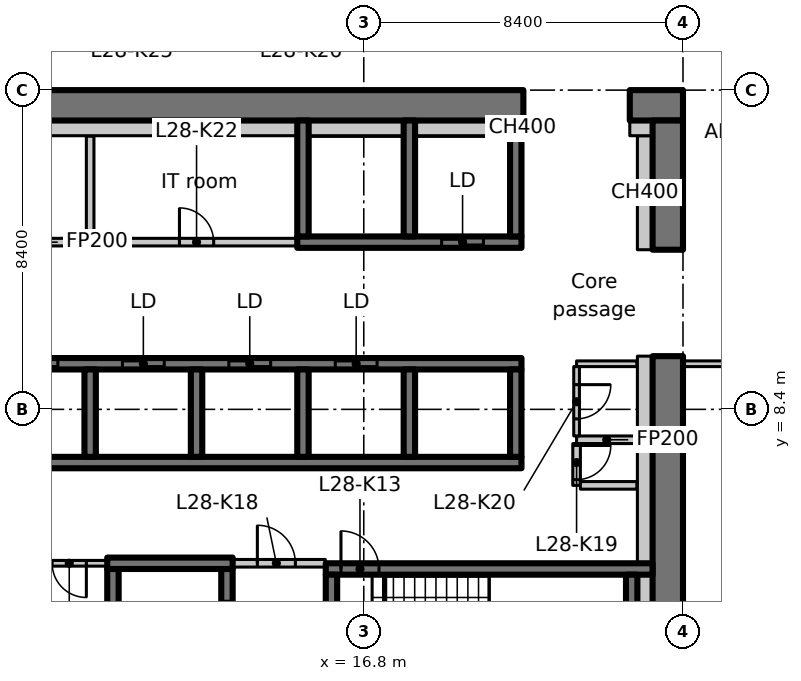
"""IFC4 building model, lengths in metres.
Left out: names, types, materials, properties, quantities, classifications, styles, units other than length and angle.
Written with IfcOpenShell. Run it as: python <this file> out.ifc"""

import sys

from ifc_helpers import new_model, si_unit, direction, frame, frame_2d, origin, place, context, subcontext, project, spatial, rectangle, extrude, element, fill, save


model = new_model("IFC4")
c1 = context("Model", 3, precision=1e-05, world=origin(), true_north=direction((0.0, 1.0)))
c2 = subcontext(c1, "Body", "Model", "MODEL_VIEW")
j1 = project(units=[si_unit("LENGTHUNIT", "METRE"), si_unit("PLANEANGLEUNIT", "RADIAN")], contexts=[c1])
p1 = place(None, origin())
s1 = spatial("IfcSite", under=j1, at=p1, CompositionType="ELEMENT")
p2 = place(p1, origin())
s2 = spatial("IfcBuilding", under=s1, at=p2, CompositionType="ELEMENT")
p3 = place(p2, frame((0.0, 0.0, 116.9)))
s3 = spatial("IfcBuildingStorey", under=s2, at=p3, CompositionType="ELEMENT", Elevation=116.9)
p4 = place(p3, frame((-1.1, 16.4, 0.0), z_axis=(0.0, 0.0, 1.0), x_axis=(1.0, 0.0, 0.0)))
e1 = element("IfcWall", 1, at=p4, inside=s3, PredefinedType="SHEAR", context=c2, shape_type="SweptSolid", body=[
    extrude(rectangle(XDim=22.1, YDim=0.8, at=frame_2d((11.05, 0.0))), origin(), (0.0, 0.0, 1.0), 3.35),
])
p5 = place(p4, frame((3.15, 0.0, 0.0)))
e2 = element("IfcOpeningElement", 2, at=p5, cuts=e1, PredefinedType="OPENING", context=c2, shape_type="SweptSolid", body=[
    extrude(rectangle(XDim=1.1, YDim=2.3, at=frame_2d((0.55, 1.15))), frame((0.0, 0.41, 0.0), z_axis=(0.0, -1.0, 0.0), x_axis=(1.0, 0.0, 0.0)), (0.0, 0.0, 1.0), 0.82),
])
p6 = place(p3, frame((23.8, 16.4, 0.0), z_axis=(0.0, 0.0, 1.0), x_axis=(1.0, 0.0, 0.0)))
e3 = element("IfcWall", 3, at=p6, inside=s3, PredefinedType="SHEAR", context=c2, shape_type="SweptSolid", body=[
    extrude(rectangle(XDim=1.4, YDim=0.8, at=frame_2d((0.7, 0.0))), origin(), (0.0, 0.0, 1.0), 3.35),
])
p7 = place(p3, frame((24.8, 0.8, 0.0), z_axis=(0.0, 0.0, 1.0), x_axis=(0.0, 1.0, 0.0)))
e4 = element("IfcWall", 4, at=p7, inside=s3, PredefinedType="SHEAR", context=c2, shape_type="SweptSolid", body=[
    extrude(rectangle(XDim=9.0, YDim=0.8, at=frame_2d((4.5, 0.0))), origin(), (0.0, 0.0, 1.0), 3.35),
])
p8 = place(p3, frame((24.8, 12.6, 0.0), z_axis=(0.0, 0.0, 1.0), x_axis=(0.0, 1.0, 0.0)))
e5 = element("IfcWall", 5, at=p8, inside=s3, PredefinedType="SHEAR", context=c2, shape_type="SweptSolid", body=[
    extrude(rectangle(XDim=3.4, YDim=0.8, at=frame_2d((1.7, 0.0))), origin(), (0.0, 0.0, 1.0), 3.35),
])
p9 = place(p3, frame((24.2, 12.6, 0.0), z_axis=(0.0, 0.0, 1.0), x_axis=(0.0, 1.0, 0.0)))
e6 = element("IfcWall", 6, at=p9, inside=s3, PredefinedType="PARTITIONING", context=c2, shape_type="SweptSolid", body=[
    extrude(rectangle(XDim=3.0, YDim=0.4, at=frame_2d((1.5, 0.0))), origin(), (0.0, 0.0, 1.0), 3.35),
])
p10 = place(p3, frame((23.8, 15.8, 0.0), z_axis=(0.0, 0.0, 1.0), x_axis=(1.0, 0.0, 0.0)))
e7 = element("IfcWall", 7, at=p10, inside=s3, PredefinedType="PARTITIONING", context=c2, shape_type="SweptSolid", body=[
    extrude(rectangle(XDim=0.6, YDim=0.4, at=frame_2d((0.3, 0.0))), origin(), (0.0, 0.0, 1.0), 3.35),
])
p11 = place(p3, frame((0.8, 7.0, 0.0), z_axis=(0.0, 0.0, 1.0), x_axis=(1.0, 0.0, 0.0)))
e8 = element("IfcWall", 8, at=p11, inside=s3, PredefinedType="SHEAR", context=c2, shape_type="SweptSolid", body=[
    extrude(rectangle(XDim=20.15, YDim=0.3, at=frame_2d((10.075, 0.0))), origin(), (0.0, 0.0, 1.0), 3.35),
])
p12 = place(p3, frame((0.8, 9.6, 0.0), z_axis=(0.0, 0.0, 1.0), x_axis=(1.0, 0.0, 0.0)))
e9 = element("IfcWall", 9, at=p12, inside=s3, PredefinedType="SHEAR", context=c2, shape_type="SweptSolid", body=[
    extrude(rectangle(XDim=20.15, YDim=0.3, at=frame_2d((10.075, 0.0))), origin(), (0.0, 0.0, 1.0), 3.35),
])
p13 = place(p12, frame((1.25, 0.0, 0.0)))
e10 = element("IfcOpeningElement", 10, at=p13, cuts=e9, PredefinedType="OPENING", context=c2, shape_type="SweptSolid", body=[
    extrude(rectangle(XDim=1.1, YDim=2.3, at=frame_2d((0.55, 1.15))), frame((0.0, 0.16, 0.0), z_axis=(0.0, -1.0, 0.0), x_axis=(1.0, 0.0, 0.0)), (0.0, 0.0, 1.0), 0.32),
])
p14 = place(p12, frame((4.05, 0.0, 0.0)))
e11 = element("IfcOpeningElement", 11, at=p14, cuts=e9, PredefinedType="OPENING", context=c2, shape_type="SweptSolid", body=[
    extrude(rectangle(XDim=1.1, YDim=2.3, at=frame_2d((0.55, 1.15))), frame((0.0, 0.16, 0.0), z_axis=(0.0, -1.0, 0.0), x_axis=(1.0, 0.0, 0.0)), (0.0, 0.0, 1.0), 0.32),
])
p15 = place(p12, frame((6.85, 0.0, 0.0)))
e12 = element("IfcOpeningElement", 12, at=p15, cuts=e9, PredefinedType="OPENING", context=c2, shape_type="SweptSolid", body=[
    extrude(rectangle(XDim=1.1, YDim=2.3, at=frame_2d((0.55, 1.15))), frame((0.0, 0.16, 0.0), z_axis=(0.0, -1.0, 0.0), x_axis=(1.0, 0.0, 0.0)), (0.0, 0.0, 1.0), 0.32),
])
p16 = place(p12, frame((9.65, 0.0, 0.0)))
e13 = element("IfcOpeningElement", 13, at=p16, cuts=e9, PredefinedType="OPENING", context=c2, shape_type="SweptSolid", body=[
    extrude(rectangle(XDim=1.1, YDim=2.3, at=frame_2d((0.55, 1.15))), frame((0.0, 0.16, 0.0), z_axis=(0.0, -1.0, 0.0), x_axis=(1.0, 0.0, 0.0)), (0.0, 0.0, 1.0), 0.32),
])
p17 = place(p12, frame((12.45, 0.0, 0.0)))
e14 = element("IfcOpeningElement", 14, at=p17, cuts=e9, PredefinedType="OPENING", context=c2, shape_type="SweptSolid", body=[
    extrude(rectangle(XDim=1.1, YDim=2.3, at=frame_2d((0.55, 1.15))), frame((0.0, 0.16, 0.0), z_axis=(0.0, -1.0, 0.0), x_axis=(1.0, 0.0, 0.0)), (0.0, 0.0, 1.0), 0.32),
])
p18 = place(p12, frame((15.25, 0.0, 0.0)))
e15 = element("IfcOpeningElement", 15, at=p18, cuts=e9, PredefinedType="OPENING", context=c2, shape_type="SweptSolid", body=[
    extrude(rectangle(XDim=1.1, YDim=2.3, at=frame_2d((0.55, 1.15))), frame((0.0, 0.16, 0.0), z_axis=(0.0, -1.0, 0.0), x_axis=(1.0, 0.0, 0.0)), (0.0, 0.0, 1.0), 0.32),
])
for number, where, z_axis, x_axis in (
    (16, (9.6, 7.15, 0.0), (0.0, 0.0, 1.0), (0.0, 1.0, 0.0)),
    (17, (12.4, 7.15, 0.0), (0.0, 0.0, 1.0), (0.0, 1.0, 0.0)),
    (18, (15.2, 7.15, 0.0), (0.0, 0.0, 1.0), (0.0, 1.0, 0.0)),
    (19, (18.0, 7.15, 0.0), (0.0, 0.0, 1.0), (0.0, 1.0, 0.0)),
    (20, (20.8, 7.15, 0.0), (0.0, 0.0, 1.0), (0.0, 1.0, 0.0)),
):
    element("IfcWall", number, at=place(p3, frame(where, z_axis=z_axis, x_axis=x_axis)), inside=s3, PredefinedType="SHEAR", context=c2, shape_type="SweptSolid", body=[
        extrude(rectangle(XDim=2.3, YDim=0.3, at=frame_2d((1.15, 0.0))), origin(), (0.0, 0.0, 1.0), 3.35),
    ])
p19 = place(p3, frame((15.05, 12.8, 0.0), z_axis=(0.0, 0.0, 1.0), x_axis=(1.0, 0.0, 0.0)))
e21 = element("IfcWall", 21, at=p19, inside=s3, PredefinedType="SHEAR", context=c2, shape_type="SweptSolid", body=[
    extrude(rectangle(XDim=5.9, YDim=0.3, at=frame_2d((2.95, 0.0))), origin(), (0.0, 0.0, 1.0), 3.35),
])
p20 = place(p19, frame((3.8, 0.0, 0.0)))
e22 = element("IfcOpeningElement", 22, at=p20, cuts=e21, PredefinedType="OPENING", context=c2, shape_type="SweptSolid", body=[
    extrude(rectangle(XDim=1.1, YDim=2.3, at=frame_2d((0.55, 1.15))), frame((0.0, 0.16, 0.0), z_axis=(0.0, -1.0, 0.0), x_axis=(1.0, 0.0, 0.0)), (0.0, 0.0, 1.0), 0.32),
])
for number, where, z_axis, x_axis in (
    (23, (15.2, 12.95, 0.0), (0.0, 0.0, 1.0), (0.0, 1.0, 0.0)),
    (24, (18.0, 12.95, 0.0), (0.0, 0.0, 1.0), (0.0, 1.0, 0.0)),
    (25, (20.8, 12.95, 0.0), (0.0, 0.0, 1.0), (0.0, 1.0, 0.0)),
):
    element("IfcWall", number, at=place(p3, frame(where, z_axis=z_axis, x_axis=x_axis)), inside=s3, PredefinedType="SHEAR", context=c2, shape_type="SweptSolid", body=[
        extrude(rectangle(XDim=3.05, YDim=0.3, at=frame_2d((1.525, 0.0))), origin(), (0.0, 0.0, 1.0), 3.35),
    ])
p21 = place(p3, frame((10.2, 0.8, 0.0), z_axis=(0.0, 0.0, 1.0), x_axis=(0.0, 1.0, 0.0)))
e26 = element("IfcWall", 26, at=p21, inside=s3, PredefinedType="SHEAR", context=c2, shape_type="SweptSolid", body=[
    extrude(rectangle(XDim=3.4, YDim=0.3, at=frame_2d((1.7, 0.0))), origin(), (0.0, 0.0, 1.0), 3.35),
])
p22 = place(p3, frame((13.2, 0.8, 0.0), z_axis=(0.0, 0.0, 1.0), x_axis=(0.0, 1.0, 0.0)))
e27 = element("IfcWall", 27, at=p22, inside=s3, PredefinedType="SHEAR", context=c2, shape_type="SweptSolid", body=[
    extrude(rectangle(XDim=3.4, YDim=0.3, at=frame_2d((1.7, 0.0))), origin(), (0.0, 0.0, 1.0), 3.35),
])
p23 = place(p22, frame((1.45, 0.0, 0.0)))
e28 = element("IfcOpeningElement", 28, at=p23, cuts=e27, PredefinedType="OPENING", context=c2, shape_type="SweptSolid", body=[
    extrude(rectangle(XDim=1.1, YDim=2.3, at=frame_2d((0.55, 1.15))), frame((0.0, 0.16, 0.0), z_axis=(0.0, -1.0, 0.0), x_axis=(1.0, 0.0, 0.0)), (0.0, 0.0, 1.0), 0.32),
])
p24 = place(p3, frame((10.05, 4.35, 0.0), z_axis=(0.0, 0.0, 1.0), x_axis=(1.0, 0.0, 0.0)))
e29 = element("IfcWall", 29, at=p24, inside=s3, PredefinedType="SHEAR", context=c2, shape_type="SweptSolid", body=[
    extrude(rectangle(XDim=3.3, YDim=0.3, at=frame_2d((1.65, 0.0))), origin(), (0.0, 0.0, 1.0), 3.35),
])
p25 = place(p3, frame((15.8, 4.2, 0.0), z_axis=(0.0, 0.0, 1.0), x_axis=(1.0, 0.0, 0.0)))
e30 = element("IfcWall", 30, at=p25, inside=s3, PredefinedType="SHEAR", context=c2, shape_type="SweptSolid", body=[
    extrude(rectangle(XDim=8.6, YDim=0.3, at=frame_2d((4.3, 0.0))), origin(), (0.0, 0.0, 1.0), 3.35),
])
p26 = place(p25, frame((0.4, 0.0, 0.0)))
e31 = element("IfcOpeningElement", 31, at=p26, cuts=e30, PredefinedType="OPENING", context=c2, shape_type="SweptSolid", body=[
    extrude(rectangle(XDim=1.0, YDim=2.1, at=frame_2d((0.5, 1.05))), frame((0.0, 0.16, 0.0), z_axis=(0.0, -1.0, 0.0), x_axis=(1.0, 0.0, 0.0)), (0.0, 0.0, 1.0), 0.32),
])
p27 = place(p3, frame((15.95, 1.5, 0.0), z_axis=(0.0, 0.0, 1.0), x_axis=(0.0, 1.0, 0.0)))
e32 = element("IfcWall", 32, at=p27, inside=s3, PredefinedType="SHEAR", context=c2, shape_type="SweptSolid", body=[
    extrude(rectangle(XDim=2.55, YDim=0.3, at=frame_2d((1.275, 0.0))), origin(), (0.0, 0.0, 1.0), 3.35),
])
p28 = place(p27, frame((0.8, 0.0, 0.0)))
e33 = element("IfcOpeningElement", 33, at=p28, cuts=e32, PredefinedType="OPENING", context=c2, shape_type="SweptSolid", body=[
    extrude(rectangle(XDim=1.0, YDim=2.1, at=frame_2d((0.5, 1.05))), frame((0.0, 0.16, 0.0), z_axis=(0.0, -1.0, 0.0), x_axis=(1.0, 0.0, 0.0)), (0.0, 0.0, 1.0), 0.32),
])
p29 = place(p3, frame((23.85, 1.5, 0.0), z_axis=(0.0, 0.0, 1.0), x_axis=(0.0, 1.0, 0.0)))
e34 = element("IfcWall", 34, at=p29, inside=s3, PredefinedType="SHEAR", context=c2, shape_type="SweptSolid", body=[
    extrude(rectangle(XDim=2.55, YDim=0.3, at=frame_2d((1.275, 0.0))), origin(), (0.0, 0.0, 1.0), 3.35),
])
p30 = place(p3, frame((13.362, 4.35, 0.0), z_axis=(0.0, 0.0, 1.0), x_axis=(1.0, 0.0, 0.0)))
e35 = element("IfcWall", 35, at=p30, inside=s3, PredefinedType="PARTITIONING", context=c2, shape_type="SweptSolid", body=[
    extrude(rectangle(XDim=2.426, YDim=0.2, at=frame_2d((1.213, 0.0))), origin(), (0.0, 0.0, 1.0), 3.35),
])
p31 = place(p30, frame((0.638, 0.0, 0.0)))
e36 = element("IfcOpeningElement", 36, at=p31, cuts=e35, PredefinedType="OPENING", context=c2, shape_type="SweptSolid", body=[
    extrude(rectangle(XDim=1.0, YDim=2.1, at=frame_2d((0.5, 1.05))), frame((0.0, 0.11, 0.0), z_axis=(0.0, -1.0, 0.0), x_axis=(1.0, 0.0, 0.0)), (0.0, 0.0, 1.0), 0.22),
])
p32 = place(p3, frame((4.162, 12.8, 0.0), z_axis=(0.0, 0.0, 1.0), x_axis=(1.0, 0.0, 0.0)))
e37 = element("IfcWall", 37, at=p32, inside=s3, PredefinedType="PARTITIONING", context=c2, shape_type="SweptSolid", body=[
    extrude(rectangle(XDim=5.438, YDim=0.2, at=frame_2d((2.719, 0.0))), origin(), (0.0, 0.0, 1.0), 3.35),
])
p33 = place(p32, frame((2.188, 0.0, 0.0)))
e38 = element("IfcOpeningElement", 38, at=p33, cuts=e37, PredefinedType="OPENING", context=c2, shape_type="SweptSolid", body=[
    extrude(rectangle(XDim=0.9, YDim=2.1, at=frame_2d((0.45, 1.05))), frame((0.0, 0.11, 0.0), z_axis=(0.0, -1.0, 0.0), x_axis=(1.0, 0.0, 0.0)), (0.0, 0.0, 1.0), 0.22),
])
p34 = place(p3, frame((9.6, 12.8, 0.0), z_axis=(0.0, 0.0, 1.0), x_axis=(1.0, 0.0, 0.0)))
e39 = element("IfcWall", 39, at=p34, inside=s3, PredefinedType="PARTITIONING", context=c2, shape_type="SweptSolid", body=[
    extrude(rectangle(XDim=5.438, YDim=0.2, at=frame_2d((2.719, 0.0))), origin(), (0.0, 0.0, 1.0), 3.35),
])
p35 = place(p34, frame((2.35, 0.0, 0.0)))
e40 = element("IfcOpeningElement", 40, at=p35, cuts=e39, PredefinedType="OPENING", context=c2, shape_type="SweptSolid", body=[
    extrude(rectangle(XDim=0.9, YDim=2.1, at=frame_2d((0.45, 1.05))), frame((0.0, 0.11, 0.0), z_axis=(0.0, -1.0, 0.0), x_axis=(1.0, 0.0, 0.0)), (0.0, 0.0, 1.0), 0.22),
])
p36 = place(p3, frame((9.6, 15.588, 0.0), z_axis=(0.0, 0.0, 1.0), x_axis=(0.0, -1.0, 0.0)))
e41 = element("IfcWall", 41, at=p36, inside=s3, PredefinedType="PARTITIONING", context=c2, shape_type="SweptSolid", body=[
    extrude(rectangle(XDim=2.688, YDim=0.2, at=frame_2d((1.344, 0.0))), origin(), (0.0, 0.0, 1.0), 3.35),
])
p37 = place(p3, frame((23.988, 7.6, 0.0), z_axis=(0.0, 0.0, 1.0), x_axis=(-1.0, 0.0, 0.0)))
e42 = element("IfcWall", 42, at=p37, inside=s3, PredefinedType="PARTITIONING", context=c2, shape_type="SweptSolid", body=[
    extrude(rectangle(XDim=1.588, YDim=0.2, at=frame_2d((0.794, 0.0))), origin(), (0.0, 0.0, 1.0), 3.35),
])
p38 = place(p3, frame((22.4, 7.5, 0.0), z_axis=(0.0, 0.0, 1.0), x_axis=(0.0, -1.0, 0.0)))
e43 = element("IfcWall", 43, at=p38, inside=s3, PredefinedType="PARTITIONING", context=c2, shape_type="SweptSolid", body=[
    extrude(rectangle(XDim=1.1, YDim=0.2, at=frame_2d((0.55, 0.0))), origin(), (0.0, 0.0, 1.0), 3.35),
])
p39 = place(p38, frame((0.05, 0.0, 0.0)))
e44 = element("IfcOpeningElement", 44, at=p39, cuts=e43, PredefinedType="OPENING", context=c2, shape_type="SweptSolid", body=[
    extrude(rectangle(XDim=0.9, YDim=2.1, at=frame_2d((0.45, 1.05))), frame((0.0, 0.11, 0.0), z_axis=(0.0, -1.0, 0.0), x_axis=(1.0, 0.0, 0.0)), (0.0, 0.0, 1.0), 0.22),
])
p40 = place(p3, frame((22.5, 6.4, 0.0), z_axis=(0.0, 0.0, 1.0), x_axis=(1.0, 0.0, 0.0)))
e45 = element("IfcWall", 45, at=p40, inside=s3, PredefinedType="PARTITIONING", context=c2, shape_type="SweptSolid", body=[
    extrude(rectangle(XDim=1.488, YDim=0.2, at=frame_2d((0.744, 0.0))), origin(), (0.0, 0.0, 1.0), 3.35),
])
p41 = place(p3, frame((10.038, 4.35, 0.0), z_axis=(0.0, 0.0, 1.0), x_axis=(-1.0, 0.0, 0.0)))
e46 = element("IfcWall", 46, at=p41, inside=s3, PredefinedType="PARTITIONING", context=c2, shape_type="SweptSolid", body=[
    extrude(rectangle(XDim=2.063, YDim=0.15, at=frame_2d((1.031, 0.0))), origin(), (0.0, 0.0, 1.0), 3.35),
])
p42 = place(p41, frame((0.538, 0.0, 0.0)))
e47 = element("IfcOpeningElement", 47, at=p42, cuts=e46, PredefinedType="OPENING", context=c2, shape_type="SweptSolid", body=[
    extrude(rectangle(XDim=0.9, YDim=2.1, at=frame_2d((0.45, 1.05))), frame((0.0, 0.085, 0.0), z_axis=(0.0, -1.0, 0.0), x_axis=(1.0, 0.0, 0.0)), (0.0, 0.0, 1.0), 0.17),
])
p43 = place(p3, frame((23.988, 9.6, 0.0), z_axis=(0.0, 0.0, 1.0), x_axis=(-1.0, 0.0, 0.0)))
e48 = element("IfcWall", 48, at=p43, inside=s3, PredefinedType="PARTITIONING", context=c2, shape_type="SweptSolid", body=[
    extrude(rectangle(XDim=1.588, YDim=0.15, at=frame_2d((0.794, 0.0))), origin(), (0.0, 0.0, 1.0), 3.35),
])
p44 = place(p3, frame((22.4, 9.525, 0.0), z_axis=(0.0, 0.0, 1.0), x_axis=(0.0, -1.0, 0.0)))
e49 = element("IfcWall", 49, at=p44, inside=s3, PredefinedType="PARTITIONING", context=c2, shape_type="SweptSolid", body=[
    extrude(rectangle(XDim=1.825, YDim=0.15, at=frame_2d((0.913, 0.0))), origin(), (0.0, 0.0, 1.0), 3.35),
])
p45 = place(p44, frame((0.475, 0.0, 0.0)))
e50 = element("IfcOpeningElement", 50, at=p45, cuts=e49, PredefinedType="OPENING", context=c2, shape_type="SweptSolid", body=[
    extrude(rectangle(XDim=0.9, YDim=2.1, at=frame_2d((0.45, 1.05))), frame((0.0, 0.085, 0.0), z_axis=(0.0, -1.0, 0.0), x_axis=(1.0, 0.0, 0.0)), (0.0, 0.0, 1.0), 0.17),
])
p46 = place(p3, frame((4.15, 15.8, 0.0), z_axis=(0.0, 0.0, 1.0), x_axis=(1.0, 0.0, 0.0)))
e51 = element("IfcWall", 51, at=p46, inside=s3, PredefinedType="PARTITIONING", context=c2, shape_type="SweptSolid", body=[
    extrude(rectangle(XDim=10.9, YDim=0.4, at=frame_2d((5.45, 0.0))), origin(), (0.0, 0.0, 1.0), 3.35),
])
for number, where, z_axis, x_axis in (
    (52, (15.35, 15.8, 0.0), (0.0, 0.0, 1.0), (1.0, 0.0, 0.0)),
    (53, (18.15, 15.8, 0.0), (0.0, 0.0, 1.0), (1.0, 0.0, 0.0)),
):
    element("IfcWall", number, at=place(p3, frame(where, z_axis=z_axis, x_axis=x_axis)), inside=s3, PredefinedType="PARTITIONING", context=c2, shape_type="SweptSolid", body=[
        extrude(rectangle(XDim=2.5, YDim=0.4, at=frame_2d((1.25, 0.0))), origin(), (0.0, 0.0, 1.0), 3.35),
    ])
p47 = place(p3, frame((20.95, 15.8, 0.0), z_axis=(0.0, 0.0, 1.0), x_axis=(1.0, 0.0, 0.0)))
e54 = element("IfcWall", 54, at=p47, inside=s3, PredefinedType="PARTITIONING", context=c2, shape_type="SweptSolid", body=[
    extrude(rectangle(XDim=0.05, YDim=0.4, at=frame_2d((0.025, 0.0))), origin(), (0.0, 0.0, 1.0), 3.35),
])
p48 = place(p3, frame((24.2, 1.5, 0.0), z_axis=(0.0, 0.0, 1.0), x_axis=(0.0, 1.0, 0.0)))
e55 = element("IfcWall", 55, at=p48, inside=s3, PredefinedType="PARTITIONING", context=c2, shape_type="SweptSolid", body=[
    extrude(rectangle(XDim=2.55, YDim=0.4, at=frame_2d((1.275, 0.0))), origin(), (0.0, 0.0, 1.0), 3.35),
])
p49 = place(p3, frame((24.2, 4.35, 0.0), z_axis=(0.0, 0.0, 1.0), x_axis=(0.0, 1.0, 0.0)))
e56 = element("IfcWall", 56, at=p49, inside=s3, PredefinedType="PARTITIONING", context=c2, shape_type="SweptSolid", body=[
    extrude(rectangle(XDim=5.45, YDim=0.4, at=frame_2d((2.725, 0.0))), origin(), (0.0, 0.0, 1.0), 3.35),
])
p50 = place(p3, frame((29.4, 9.6, 0.0), z_axis=(0.0, 0.0, 1.0), x_axis=(-1.0, 0.0, 0.0)))
e57 = element("IfcWall", 57, at=p50, inside=s3, PredefinedType="PARTITIONING", context=c2, shape_type="SweptSolid", body=[
    extrude(rectangle(XDim=4.2, YDim=0.15, at=frame_2d((2.1, 0.0))), origin(), (0.0, 0.0, 1.0), 3.33),
])
p51 = place(p50, frame((1.5, 0.0, 0.0)))
e58 = element("IfcOpeningElement", 58, at=p51, cuts=e57, PredefinedType="OPENING", context=c2, shape_type="SweptSolid", body=[
    extrude(rectangle(XDim=1.1, YDim=2.1, at=frame_2d((0.55, 1.05))), frame((0.0, 0.085, 0.0), z_axis=(0.0, -1.0, 0.0), x_axis=(1.0, 0.0, 0.0)), (0.0, 0.0, 1.0), 0.17),
])
p52 = place(p15, origin())
e59 = element("IfcDoor", 59, at=p52, inside=s3, OperationType="SLIDING_TO_LEFT", PredefinedType="DOOR", context=c2, shape_type="SweptSolid", body=[
    extrude(rectangle(XDim=1.1, YDim=2.3, at=frame_2d((0.55, 1.15))), frame((0.0, 0.025, 0.0), z_axis=(0.0, -1.0, 0.0), x_axis=(1.0, 0.0, 0.0)), (0.0, 0.0, 1.0), 0.05),
])
fill(e12, e59)
p53 = place(p16, origin())
e60 = element("IfcDoor", 60, at=p53, inside=s3, OperationType="SLIDING_TO_LEFT", PredefinedType="DOOR", context=c2, shape_type="SweptSolid", body=[
    extrude(rectangle(XDim=1.1, YDim=2.3, at=frame_2d((0.55, 1.15))), frame((0.0, 0.025, 0.0), z_axis=(0.0, -1.0, 0.0), x_axis=(1.0, 0.0, 0.0)), (0.0, 0.0, 1.0), 0.05),
])
fill(e13, e60)
p54 = place(p17, origin())
e61 = element("IfcDoor", 61, at=p54, inside=s3, OperationType="SLIDING_TO_LEFT", PredefinedType="DOOR", context=c2, shape_type="SweptSolid", body=[
    extrude(rectangle(XDim=1.1, YDim=2.3, at=frame_2d((0.55, 1.15))), frame((0.0, 0.025, 0.0), z_axis=(0.0, -1.0, 0.0), x_axis=(1.0, 0.0, 0.0)), (0.0, 0.0, 1.0), 0.05),
])
fill(e14, e61)
p55 = place(p18, origin())
e62 = element("IfcDoor", 62, at=p55, inside=s3, OperationType="SLIDING_TO_LEFT", PredefinedType="DOOR", context=c2, shape_type="SweptSolid", body=[
    extrude(rectangle(XDim=1.1, YDim=2.3, at=frame_2d((0.55, 1.15))), frame((0.0, 0.025, 0.0), z_axis=(0.0, -1.0, 0.0), x_axis=(1.0, 0.0, 0.0)), (0.0, 0.0, 1.0), 0.05),
])
fill(e15, e62)
p56 = place(p20, origin())
e63 = element("IfcDoor", 63, at=p56, inside=s3, OperationType="SLIDING_TO_LEFT", PredefinedType="DOOR", context=c2, shape_type="SweptSolid", body=[
    extrude(rectangle(XDim=1.1, YDim=2.3, at=frame_2d((0.55, 1.15))), frame((0.0, 0.025, 0.0), z_axis=(0.0, -1.0, 0.0), x_axis=(1.0, 0.0, 0.0)), (0.0, 0.0, 1.0), 0.05),
])
fill(e22, e63)
p57 = place(p26, origin())
e64 = element("IfcDoor", 64, at=p57, inside=s3, OperationType="SINGLE_SWING_LEFT", PredefinedType="DOOR", context=c2, shape_type="SweptSolid", body=[
    extrude(rectangle(XDim=1.0, YDim=2.1, at=frame_2d((0.5, 1.05))), frame((0.0, 0.025, 0.0), z_axis=(0.0, -1.0, 0.0), x_axis=(1.0, 0.0, 0.0)), (0.0, 0.0, 1.0), 0.05),
])
fill(e31, e64)
p58 = place(p42, origin())
e65 = element("IfcDoor", 65, at=p58, inside=s3, OperationType="SINGLE_SWING_LEFT", PredefinedType="DOOR", context=c2, shape_type="SweptSolid", body=[
    extrude(rectangle(XDim=0.9, YDim=2.1, at=frame_2d((0.45, 1.05))), frame((0.0, 0.025, 0.0), z_axis=(0.0, -1.0, 0.0), x_axis=(1.0, 0.0, 0.0)), (0.0, 0.0, 1.0), 0.05),
])
fill(e47, e65)
p59 = place(p31, origin())
e66 = element("IfcDoor", 66, at=p59, inside=s3, OperationType="SINGLE_SWING_RIGHT", PredefinedType="DOOR", context=c2, shape_type="SweptSolid", body=[
    extrude(rectangle(XDim=1.0, YDim=2.1, at=frame_2d((0.5, 1.05))), frame((0.0, 0.025, 0.0), z_axis=(0.0, -1.0, 0.0), x_axis=(1.0, 0.0, 0.0)), (0.0, 0.0, 1.0), 0.05),
])
fill(e36, e66)
p60 = place(p39, origin())
e67 = element("IfcDoor", 67, at=p60, inside=s3, OperationType="SINGLE_SWING_LEFT", PredefinedType="DOOR", context=c2, shape_type="SweptSolid", body=[
    extrude(rectangle(XDim=0.9, YDim=2.1, at=frame_2d((0.45, 1.05))), frame((0.0, 0.025, 0.0), z_axis=(0.0, -1.0, 0.0), x_axis=(1.0, 0.0, 0.0)), (0.0, 0.0, 1.0), 0.05),
])
fill(e44, e67)
p61 = place(p45, origin())
e68 = element("IfcDoor", 68, at=p61, inside=s3, OperationType="SINGLE_SWING_RIGHT", PredefinedType="DOOR", context=c2, shape_type="SweptSolid", body=[
    extrude(rectangle(XDim=0.9, YDim=2.1, at=frame_2d((0.45, 1.05))), frame((0.0, 0.025, 0.0), z_axis=(0.0, -1.0, 0.0), x_axis=(1.0, 0.0, 0.0)), (0.0, 0.0, 1.0), 0.05),
])
fill(e50, e68)
p62 = place(p35, origin())
e69 = element("IfcDoor", 69, at=p62, inside=s3, OperationType="SINGLE_SWING_RIGHT", PredefinedType="DOOR", context=c2, shape_type="SweptSolid", body=[
    extrude(rectangle(XDim=0.9, YDim=2.1, at=frame_2d((0.45, 1.05))), frame((0.0, 0.025, 0.0), z_axis=(0.0, -1.0, 0.0), x_axis=(1.0, 0.0, 0.0)), (0.0, 0.0, 1.0), 0.05),
])
fill(e40, e69)
save(model, sys.argv[1])
